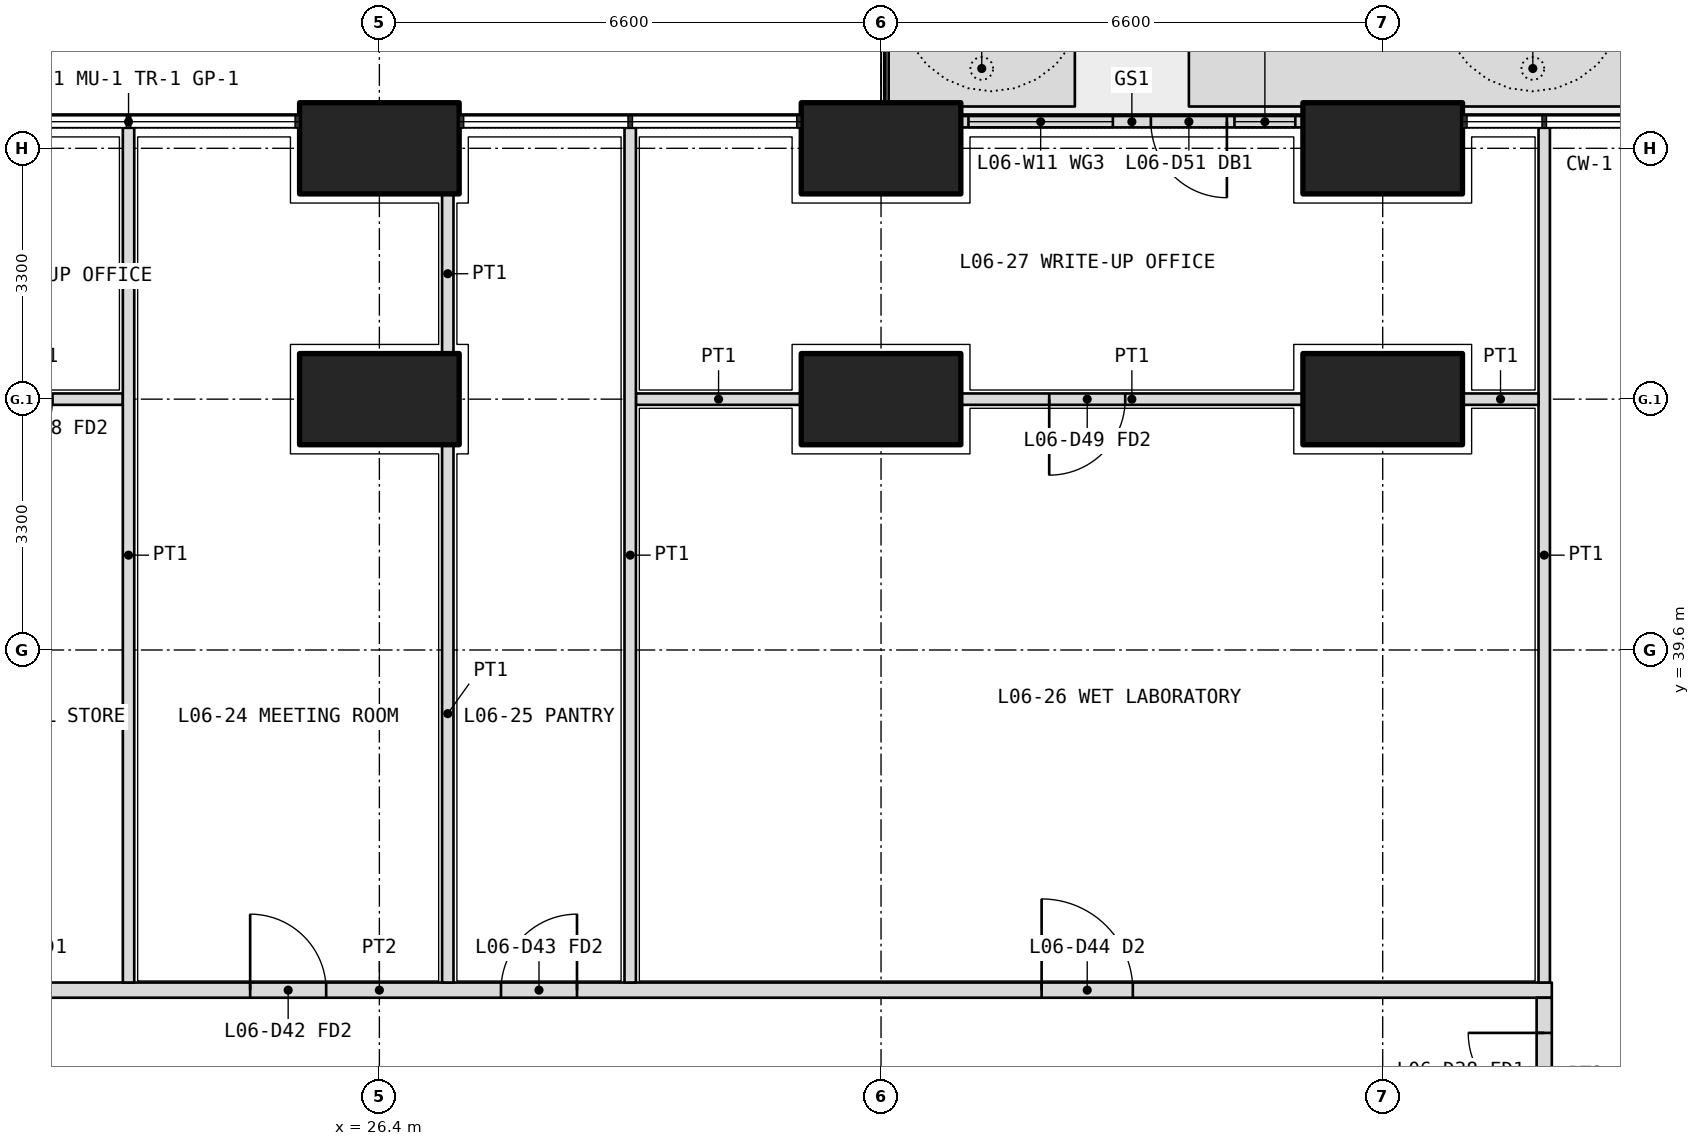
"""IFC4 building model, lengths in metres.
Left out: names, types, materials, properties, quantities, classifications, styles, units other than length and angle.
Written with IfcOpenShell. Run it as: python <this file> out.ifc"""

import sys

from ifc_helpers import new_model, si_unit, direction, frame, frame_2d, origin, origin_2d, place, context, subcontext, project, spatial, polyline, rectangle, outline, extrude, element, fill, save


model = new_model("IFC4")
c1 = context("Model", 3, precision=1e-05, world=origin(), true_north=direction((0.0, 1.0)))
c2 = subcontext(c1, "Body", "Model", "MODEL_VIEW")
j1 = project(units=[si_unit("LENGTHUNIT", "METRE"), si_unit("PLANEANGLEUNIT", "RADIAN")], contexts=[c1])
p1 = place(None, origin())
s1 = spatial("IfcSite", under=j1, at=p1, CompositionType="ELEMENT")
p2 = place(p1, origin())
s2 = spatial("IfcBuilding", under=s1, at=p2, CompositionType="ELEMENT")
p3 = place(p2, frame((0.0, 0.0, 29.7)))
s3 = spatial("IfcBuildingStorey", under=s2, at=p3, CompositionType="ELEMENT", Elevation=29.7)
for number, where, z_axis, x_axis in (
    (1, (26.4, 46.2, 0.0), (0.0, 0.0, 1.0), (1.0, 0.0, 0.0)),
    (2, (33.0, 46.2, 0.0), (0.0, 0.0, 1.0), (1.0, 0.0, 0.0)),
    (3, (39.6, 46.2, 0.0), (0.0, 0.0, 1.0), (1.0, 0.0, 0.0)),
    (4, (26.4, 42.9, 0.0), (0.0, 0.0, 1.0), (1.0, 0.0, 0.0)),
    (5, (33.0, 42.9, 0.0), (0.0, 0.0, 1.0), (1.0, 0.0, 0.0)),
    (6, (39.6, 42.9, 0.0), (0.0, 0.0, 1.0), (1.0, 0.0, 0.0)),
):
    element("IfcColumn", number, at=place(p3, frame(where, z_axis=z_axis, x_axis=x_axis)), inside=s3, PredefinedType="COLUMN", context=c2, shape_type="SweptSolid", body=[
        extrude(rectangle(XDim=2.1, YDim=1.2, at=origin_2d()), origin(), (0.0, 0.0, 1.0), 4.2),
    ])
p4 = place(p3, origin())
e7 = element("IfcWall", 7, at=p4, inside=s3, PredefinedType="USERDEFINED", context=c2, shape_type="SweptSolid", body=[
    extrude(outline(polyline([(33.1, 46.75), (35.55, 46.75), (35.55, 47.75), (33.1, 47.75), (33.1, 46.75)]), holes=[polyline([(33.25, 46.9), (35.4, 46.9), (35.4, 47.6), (33.25, 47.6), (33.25, 46.9)])]), origin(), (0.0, 0.0, 1.0), 1.05),
])
p5 = place(p3, origin())
e8 = element("IfcWall", 8, at=p5, inside=s3, PredefinedType="USERDEFINED", context=c2, shape_type="SweptSolid", body=[
    extrude(outline(polyline([(37.05, 46.75), (46.1, 46.75), (46.1, 47.75), (37.05, 47.75), (37.05, 46.75)]), holes=[polyline([(37.2, 46.9), (45.95, 46.9), (45.95, 47.6), (37.2, 47.6), (37.2, 46.9)])]), origin(), (0.0, 0.0, 1.0), 1.05),
])
p6 = place(p3, frame((38.55, 46.55, 0.0), z_axis=(0.0, 0.0, 1.0), x_axis=(-1.0, 0.0, 0.0)))
e9 = element("IfcWall", 9, at=p6, inside=s3, PredefinedType="SOLIDWALL", context=c2, shape_type="SweptSolid", body=[
    extrude(rectangle(XDim=4.5, YDim=0.15, at=frame_2d((2.25, 0.0))), origin(), (0.0, 0.0, 1.0), 2.7),
])
p7 = place(p6, frame((1.0, 0.0, 0.0)))
e10 = element("IfcOpeningElement", 10, at=p7, cuts=e9, PredefinedType="OPENING", context=c2, shape_type="SweptSolid", body=[
    extrude(rectangle(XDim=1.0, YDim=2.4, at=frame_2d((0.5, 1.2))), frame((0.0, 0.085, 0.0), z_axis=(0.0, -1.0, 0.0), x_axis=(1.0, 0.0, 0.0)), (0.0, 0.0, 1.0), 0.17),
])
p8 = place(p6, frame((0.1, 0.0, 0.1)))
e11 = element("IfcOpeningElement", 11, at=p8, cuts=e9, PredefinedType="OPENING", context=c2, shape_type="SweptSolid", body=[
    extrude(rectangle(XDim=0.8, YDim=2.3, at=frame_2d((0.4, 1.15))), frame((0.0, 0.085, 0.0), z_axis=(0.0, -1.0, 0.0), x_axis=(1.0, 0.0, 0.0)), (0.0, 0.0, 1.0), 0.17),
])
p9 = place(p6, frame((2.5, 0.0, 0.1)))
e12 = element("IfcOpeningElement", 12, at=p9, cuts=e9, PredefinedType="OPENING", context=c2, shape_type="SweptSolid", body=[
    extrude(rectangle(XDim=1.9, YDim=2.3, at=frame_2d((0.95, 1.15))), frame((0.0, 0.085, 0.0), z_axis=(0.0, -1.0, 0.0), x_axis=(1.0, 0.0, 0.0)), (0.0, 0.0, 1.0), 0.17),
])
p10 = place(p3, frame((10.975, 35.125, 0.0), z_axis=(0.0, 0.0, 1.0), x_axis=(1.0, 0.0, 0.0)))
e13 = element("IfcWall", 13, at=p10, inside=s3, PredefinedType="PARTITIONING", context=c2, shape_type="SweptSolid", body=[
    extrude(rectangle(XDim=30.85, YDim=0.2, at=frame_2d((15.425, 0.0))), origin(), (0.0, 0.0, 1.0), 2.85),
])
p11 = place(p10, frame((0.663, 0.0, 0.0)))
e14 = element("IfcOpeningElement", 14, at=p11, cuts=e13, PredefinedType="OPENING", context=c2, shape_type="SweptSolid", body=[
    extrude(rectangle(XDim=1.0, YDim=2.1, at=frame_2d((0.5, 1.05))), frame((0.0, 0.11, 0.0), z_axis=(0.0, -1.0, 0.0), x_axis=(1.0, 0.0, 0.0)), (0.0, 0.0, 1.0), 0.22),
])
p12 = place(p10, frame((4.925, 0.0, 0.0)))
e15 = element("IfcOpeningElement", 15, at=p12, cuts=e13, PredefinedType="OPENING", context=c2, shape_type="SweptSolid", body=[
    extrude(rectangle(XDim=1.2, YDim=2.1, at=frame_2d((0.6, 1.05))), frame((0.0, 0.11, 0.0), z_axis=(0.0, -1.0, 0.0), x_axis=(1.0, 0.0, 0.0)), (0.0, 0.0, 1.0), 0.22),
])
p13 = place(p10, frame((9.975, 0.0, 0.0)))
e16 = element("IfcOpeningElement", 16, at=p13, cuts=e13, PredefinedType="OPENING", context=c2, shape_type="SweptSolid", body=[
    extrude(rectangle(XDim=1.0, YDim=2.1, at=frame_2d((0.5, 1.05))), frame((0.0, 0.11, 0.0), z_axis=(0.0, -1.0, 0.0), x_axis=(1.0, 0.0, 0.0)), (0.0, 0.0, 1.0), 0.22),
])
p14 = place(p10, frame((13.725, 0.0, 0.0)))
e17 = element("IfcOpeningElement", 17, at=p14, cuts=e13, PredefinedType="OPENING", context=c2, shape_type="SweptSolid", body=[
    extrude(rectangle(XDim=1.0, YDim=2.1, at=frame_2d((0.5, 1.05))), frame((0.0, 0.11, 0.0), z_axis=(0.0, -1.0, 0.0), x_axis=(1.0, 0.0, 0.0)), (0.0, 0.0, 1.0), 0.22),
])
p15 = place(p10, frame((17.025, 0.0, 0.0)))
e18 = element("IfcOpeningElement", 18, at=p15, cuts=e13, PredefinedType="OPENING", context=c2, shape_type="SweptSolid", body=[
    extrude(rectangle(XDim=1.0, YDim=2.1, at=frame_2d((0.5, 1.05))), frame((0.0, 0.11, 0.0), z_axis=(0.0, -1.0, 0.0), x_axis=(1.0, 0.0, 0.0)), (0.0, 0.0, 1.0), 0.22),
])
p16 = place(p10, frame((24.137, 0.0, 0.0)))
e19 = element("IfcOpeningElement", 19, at=p16, cuts=e13, PredefinedType="OPENING", context=c2, shape_type="SweptSolid", body=[
    extrude(rectangle(XDim=1.2, YDim=2.1, at=frame_2d((0.6, 1.05))), frame((0.0, 0.11, 0.0), z_axis=(0.0, -1.0, 0.0), x_axis=(1.0, 0.0, 0.0)), (0.0, 0.0, 1.0), 0.22),
])
p17 = place(p3, frame((41.725, 33.0, 0.0), z_axis=(0.0, 0.0, 1.0), x_axis=(0.0, 1.0, 0.0)))
e20 = element("IfcWall", 20, at=p17, inside=s3, PredefinedType="PARTITIONING", context=c2, shape_type="SweptSolid", body=[
    extrude(rectangle(XDim=2.025, YDim=0.2, at=frame_2d((1.012, 0.0))), origin(), (0.0, 0.0, 1.0), 2.85),
])
p18 = place(p17, frame((0.562, 0.0, 0.0)))
e21 = element("IfcOpeningElement", 21, at=p18, cuts=e20, PredefinedType="OPENING", context=c2, shape_type="SweptSolid", body=[
    extrude(rectangle(XDim=1.0, YDim=2.1, at=frame_2d((0.5, 1.05))), frame((0.0, 0.11, 0.0), z_axis=(0.0, -1.0, 0.0), x_axis=(1.0, 0.0, 0.0)), (0.0, 0.0, 1.0), 0.22),
])
p19 = place(p3, frame((41.725, 46.47, 0.0), z_axis=(0.0, 0.0, 1.0), x_axis=(0.0, -1.0, 0.0)))
e22 = element("IfcWall", 22, at=p19, inside=s3, PredefinedType="PARTITIONING", context=c2, shape_type="SweptSolid", body=[
    extrude(rectangle(XDim=11.245, YDim=0.15, at=frame_2d((5.623, 0.0))), origin(), (0.0, 0.0, 1.0), 2.7),
])
p20 = place(p3, frame((41.65, 42.9, 0.0), z_axis=(0.0, 0.0, 1.0), x_axis=(-1.0, 0.0, 0.0)))
e23 = element("IfcWall", 23, at=p20, inside=s3, PredefinedType="PARTITIONING", context=c2, shape_type="SweptSolid", body=[
    extrude(rectangle(XDim=1.0, YDim=0.15, at=frame_2d((0.5, 0.0))), origin(), (0.0, 0.0, 1.0), 3.9),
])
p21 = place(p3, frame((38.55, 42.9, 0.0), z_axis=(0.0, 0.0, 1.0), x_axis=(-1.0, 0.0, 0.0)))
e24 = element("IfcWall", 24, at=p21, inside=s3, PredefinedType="PARTITIONING", context=c2, shape_type="SweptSolid", body=[
    extrude(rectangle(XDim=4.5, YDim=0.15, at=frame_2d((2.25, 0.0))), origin(), (0.0, 0.0, 1.0), 3.9),
])
p22 = place(p21, frame((2.337, 0.0, 0.0)))
e25 = element("IfcOpeningElement", 25, at=p22, cuts=e24, PredefinedType="OPENING", context=c2, shape_type="SweptSolid", body=[
    extrude(rectangle(XDim=1.0, YDim=2.1, at=frame_2d((0.5, 1.05))), frame((0.0, 0.085, 0.0), z_axis=(0.0, -1.0, 0.0), x_axis=(1.0, 0.0, 0.0)), (0.0, 0.0, 1.0), 0.17),
])
p23 = place(p3, frame((31.95, 42.9, 0.0), z_axis=(0.0, 0.0, 1.0), x_axis=(-1.0, 0.0, 0.0)))
e26 = element("IfcWall", 26, at=p23, inside=s3, PredefinedType="PARTITIONING", context=c2, shape_type="SweptSolid", body=[
    extrude(rectangle(XDim=2.175, YDim=0.15, at=frame_2d((1.087, 0.0))), origin(), (0.0, 0.0, 1.0), 3.9),
])
p24 = place(p3, frame((23.025, 42.9, 0.0), z_axis=(0.0, 0.0, 1.0), x_axis=(-1.0, 0.0, 0.0)))
e27 = element("IfcWall", 27, at=p24, inside=s3, PredefinedType="PARTITIONING", context=c2, shape_type="SweptSolid", body=[
    extrude(rectangle(XDim=2.175, YDim=0.15, at=frame_2d((1.087, 0.0))), origin(), (0.0, 0.0, 1.0), 3.9),
])
p25 = place(p24, frame((0.925, 0.0, 0.0)))
e28 = element("IfcOpeningElement", 28, at=p25, cuts=e27, PredefinedType="OPENING", context=c2, shape_type="SweptSolid", body=[
    extrude(rectangle(XDim=1.0, YDim=2.1, at=frame_2d((0.5, 1.05))), frame((0.0, 0.085, 0.0), z_axis=(0.0, -1.0, 0.0), x_axis=(1.0, 0.0, 0.0)), (0.0, 0.0, 1.0), 0.17),
])
p26 = place(p3, frame((27.3, 45.6, 0.0), z_axis=(0.0, 0.0, 1.0), x_axis=(0.0, -1.0, 0.0)))
e29 = element("IfcWall", 29, at=p26, inside=s3, PredefinedType="PARTITIONING", context=c2, shape_type="SweptSolid", body=[
    extrude(rectangle(XDim=2.1, YDim=0.15, at=frame_2d((1.05, 0.0))), origin(), (0.0, 0.0, 1.0), 3.9),
])
p27 = place(p3, frame((27.3, 42.3, 0.0), z_axis=(0.0, 0.0, 1.0), x_axis=(0.0, -1.0, 0.0)))
e30 = element("IfcWall", 30, at=p27, inside=s3, PredefinedType="PARTITIONING", context=c2, shape_type="SweptSolid", body=[
    extrude(rectangle(XDim=7.075, YDim=0.15, at=frame_2d((3.538, 0.0))), origin(), (0.0, 0.0, 1.0), 3.9),
])
for number, where, z_axis, x_axis in (
    (31, (23.1, 46.47, 0.0), (0.0, 0.0, 1.0), (0.0, -1.0, 0.0)),
    (32, (29.7, 46.47, 0.0), (0.0, 0.0, 1.0), (0.0, -1.0, 0.0)),
):
    element("IfcWall", number, at=place(p3, frame(where, z_axis=z_axis, x_axis=x_axis)), inside=s3, PredefinedType="PARTITIONING", context=c2, shape_type="SweptSolid", body=[
        extrude(rectangle(XDim=11.245, YDim=0.15, at=frame_2d((5.623, 0.0))), origin(), (0.0, 0.0, 1.0), 2.7),
    ])
p28 = place(p7, origin())
e33 = element("IfcDoor", 33, at=p28, inside=s3, OperationType="SINGLE_SWING_LEFT", PredefinedType="DOOR", context=c2, shape_type="SweptSolid", body=[
    extrude(rectangle(XDim=1.0, YDim=2.4, at=frame_2d((0.5, 1.2))), frame((0.0, 0.025, 0.0), z_axis=(0.0, -1.0, 0.0), x_axis=(1.0, 0.0, 0.0)), (0.0, 0.0, 1.0), 0.05),
])
fill(e10, e33)
p29 = place(p8, origin())
e34 = element("IfcWindow", 34, at=p29, inside=s3, PartitioningType="SINGLE_PANEL", PredefinedType="WINDOW", context=c2, shape_type="SweptSolid", body=[
    extrude(rectangle(XDim=0.8, YDim=2.3, at=frame_2d((0.4, 1.15))), frame((0.0, 0.03, 0.0), z_axis=(0.0, -1.0, 0.0), x_axis=(1.0, 0.0, 0.0)), (0.0, 0.0, 1.0), 0.06),
])
fill(e11, e34)
p30 = place(p9, origin())
e35 = element("IfcWindow", 35, at=p30, inside=s3, PartitioningType="SINGLE_PANEL", PredefinedType="WINDOW", context=c2, shape_type="SweptSolid", body=[
    extrude(rectangle(XDim=1.9, YDim=2.3, at=frame_2d((0.95, 1.15))), frame((0.0, 0.03, 0.0), z_axis=(0.0, -1.0, 0.0), x_axis=(1.0, 0.0, 0.0)), (0.0, 0.0, 1.0), 0.06),
])
fill(e12, e35)
p31 = place(p18, origin())
e36 = element("IfcDoor", 36, at=p31, inside=s3, OperationType="SINGLE_SWING_RIGHT", PredefinedType="DOOR", context=c2, shape_type="SweptSolid", body=[
    extrude(rectangle(XDim=1.0, YDim=2.1, at=frame_2d((0.5, 1.05))), frame((0.0, 0.025, 0.0), z_axis=(0.0, -1.0, 0.0), x_axis=(1.0, 0.0, 0.0)), (0.0, 0.0, 1.0), 0.05),
])
fill(e21, e36)
p32 = place(p14, origin())
e37 = element("IfcDoor", 37, at=p32, inside=s3, OperationType="SINGLE_SWING_LEFT", PredefinedType="DOOR", context=c2, shape_type="SweptSolid", body=[
    extrude(rectangle(XDim=1.0, YDim=2.1, at=frame_2d((0.5, 1.05))), frame((0.0, 0.025, 0.0), z_axis=(0.0, -1.0, 0.0), x_axis=(1.0, 0.0, 0.0)), (0.0, 0.0, 1.0), 0.05),
])
fill(e17, e37)
p33 = place(p15, origin())
e38 = element("IfcDoor", 38, at=p33, inside=s3, OperationType="SINGLE_SWING_RIGHT", PredefinedType="DOOR", context=c2, shape_type="SweptSolid", body=[
    extrude(rectangle(XDim=1.0, YDim=2.1, at=frame_2d((0.5, 1.05))), frame((0.0, 0.025, 0.0), z_axis=(0.0, -1.0, 0.0), x_axis=(1.0, 0.0, 0.0)), (0.0, 0.0, 1.0), 0.05),
])
fill(e18, e38)
p34 = place(p16, origin())
e39 = element("IfcDoor", 39, at=p34, inside=s3, OperationType="DOUBLE_DOOR_SINGLE_SWING", PredefinedType="DOOR", context=c2, shape_type="SweptSolid", body=[
    extrude(rectangle(XDim=1.2, YDim=2.1, at=frame_2d((0.6, 1.05))), frame((0.0, 0.025, 0.0), z_axis=(0.0, -1.0, 0.0), x_axis=(1.0, 0.0, 0.0)), (0.0, 0.0, 1.0), 0.05),
])
fill(e19, e39)
p35 = place(p22, origin())
e40 = element("IfcDoor", 40, at=p35, inside=s3, OperationType="SINGLE_SWING_RIGHT", PredefinedType="DOOR", context=c2, shape_type="SweptSolid", body=[
    extrude(rectangle(XDim=1.0, YDim=2.1, at=frame_2d((0.5, 1.05))), frame((0.0, 0.025, 0.0), z_axis=(0.0, -1.0, 0.0), x_axis=(1.0, 0.0, 0.0)), (0.0, 0.0, 1.0), 0.05),
])
fill(e25, e40)
save(model, sys.argv[1])
